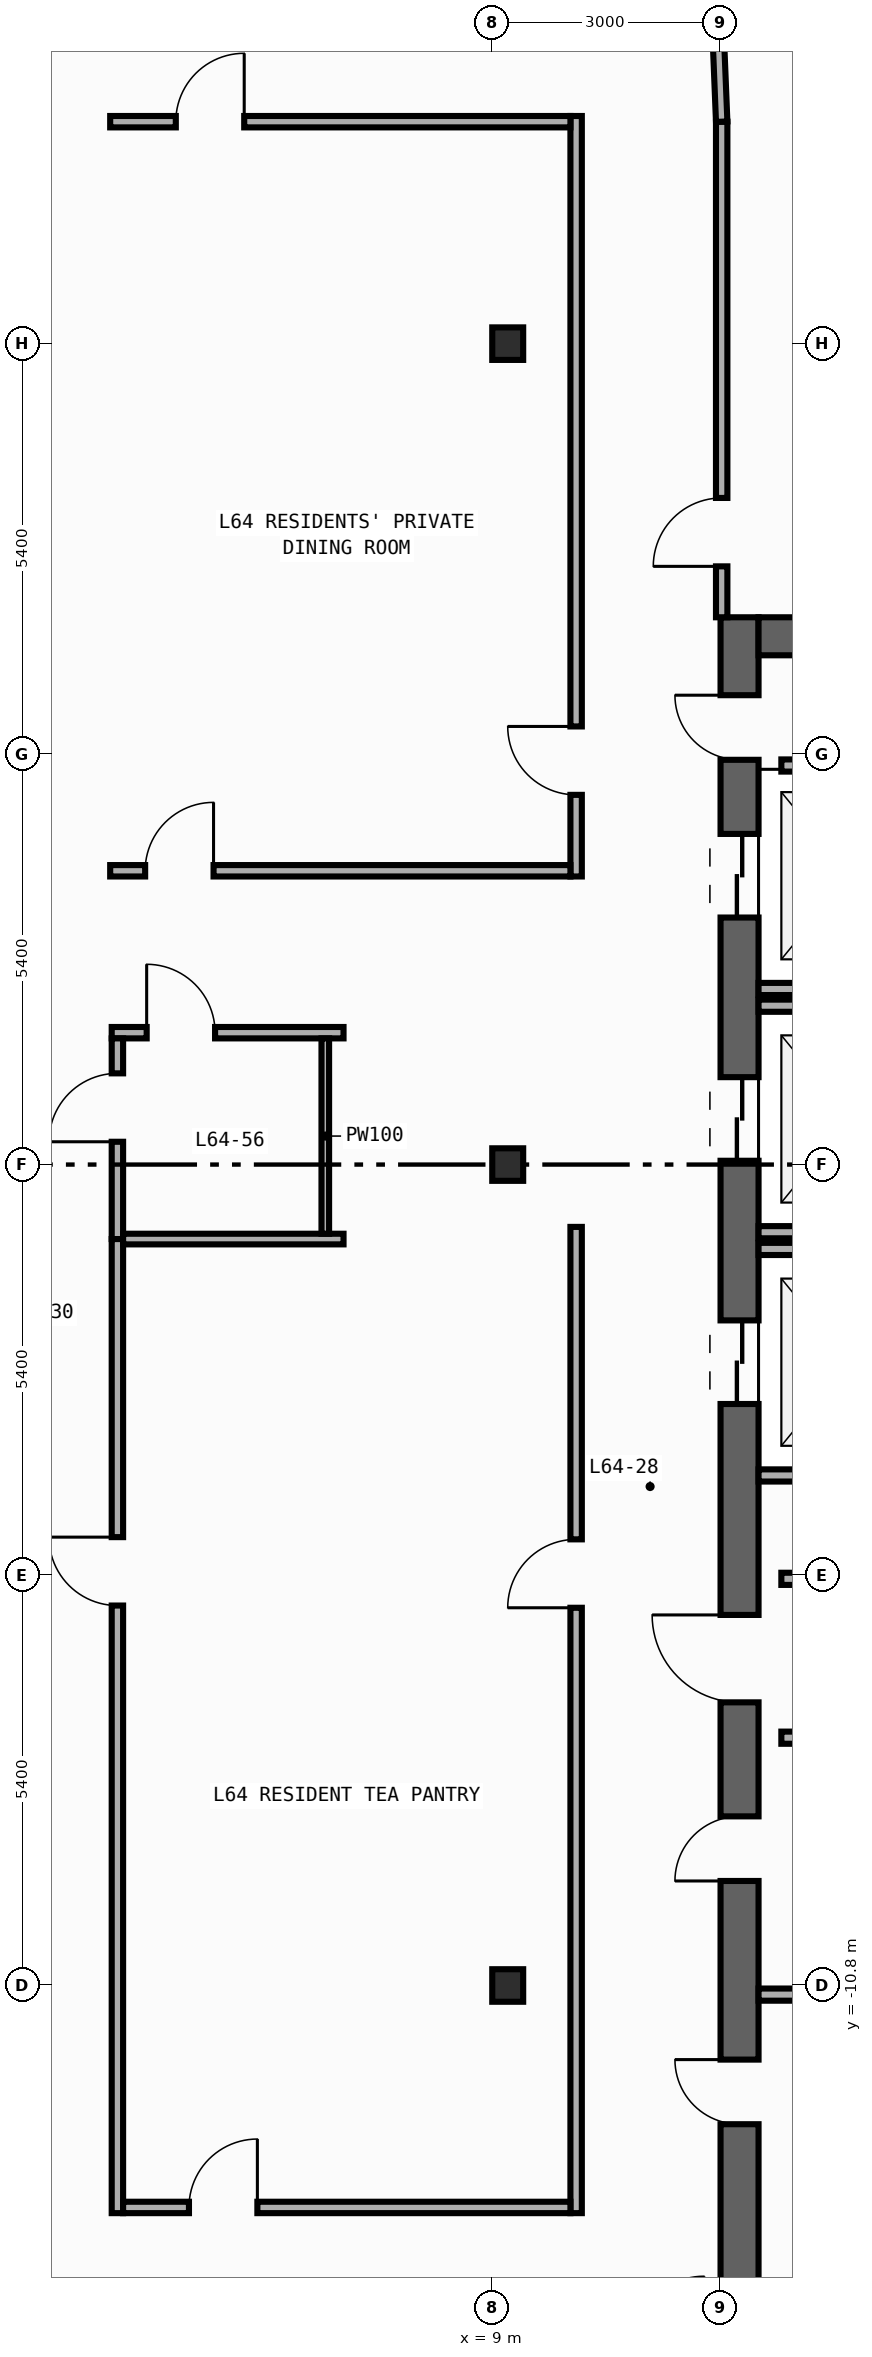
"""IFC4 building model, lengths in metres.
Left out: names, types, materials, properties, quantities, classifications, styles, units other than length and angle.
Written with IfcOpenShell. Run it as: python <this file> out.ifc"""

import sys

from ifc_helpers import new_model, si_unit, direction, frame, frame_2d, origin, origin_2d, place, context, subcontext, project, spatial, rectangle, i_section, extrude, element, fill, save


model = new_model("IFC4")
c1 = context("Model", 3, precision=1e-05, world=origin(), true_north=direction((0.0, 1.0)))
c2 = subcontext(c1, "Body", "Model", "MODEL_VIEW")
j1 = project(units=[si_unit("LENGTHUNIT", "METRE"), si_unit("PLANEANGLEUNIT", "RADIAN")], contexts=[c1])
p1 = place(None, origin())
s1 = spatial("IfcSite", under=j1, at=p1, CompositionType="ELEMENT")
p2 = place(p1, origin())
s2 = spatial("IfcBuilding", under=s1, at=p2, CompositionType="ELEMENT")
p3 = place(p2, frame((0.0, 0.0, 269.2)))
s3 = spatial("IfcBuildingStorey", under=s2, at=p3, CompositionType="ELEMENT", Elevation=269.2)
p4 = place(p3, frame((12.25, -19.8, 0.0), z_axis=(0.0, 0.0, 1.0), x_axis=(0.0, 1.0, 0.0)))
e1 = element("IfcWall", 1, at=p4, inside=s3, PredefinedType="SHEAR", context=c2, shape_type="SweptSolid", body=[
    extrude(rectangle(XDim=27.0, YDim=0.5, at=frame_2d((13.5, 0.0))), origin(), (0.0, 0.0, 1.0), 3.25),
])
p5 = place(p4, frame((23.05, 0.0, 0.0)))
e2 = element("IfcOpeningElement", 2, at=p5, cuts=e1, PredefinedType="OPENING", context=c2, shape_type="SweptSolid", body=[
    extrude(rectangle(XDim=1.1, YDim=2.2, at=frame_2d((0.55, 1.1))), frame((0.0, 0.26, 0.0), z_axis=(0.0, -1.0, 0.0), x_axis=(1.0, 0.0, 0.0)), (0.0, 0.0, 1.0), 0.52),
])
p6 = place(p4, frame((19.85, 0.0, 0.0)))
e3 = element("IfcOpeningElement", 3, at=p6, cuts=e1, PredefinedType="OPENING", context=c2, shape_type="SweptSolid", body=[
    extrude(rectangle(XDim=1.1, YDim=2.2, at=frame_2d((0.55, 1.1))), frame((0.0, 0.26, 0.0), z_axis=(0.0, -1.0, 0.0), x_axis=(1.0, 0.0, 0.0)), (0.0, 0.0, 1.0), 0.52),
])
p7 = place(p4, frame((16.65, 0.0, 0.0)))
e4 = element("IfcOpeningElement", 4, at=p7, cuts=e1, PredefinedType="OPENING", context=c2, shape_type="SweptSolid", body=[
    extrude(rectangle(XDim=1.1, YDim=2.2, at=frame_2d((0.55, 1.1))), frame((0.0, 0.26, 0.0), z_axis=(0.0, -1.0, 0.0), x_axis=(1.0, 0.0, 0.0)), (0.0, 0.0, 1.0), 0.52),
])
p8 = place(p4, frame((7.175, 0.0, 0.0)))
e5 = element("IfcOpeningElement", 5, at=p8, cuts=e1, PredefinedType="OPENING", context=c2, shape_type="SweptSolid", body=[
    extrude(rectangle(XDim=0.85, YDim=2.1, at=frame_2d((0.425, 1.05))), frame((0.0, 0.26, 0.0), z_axis=(0.0, -1.0, 0.0), x_axis=(1.0, 0.0, 0.0)), (0.0, 0.0, 1.0), 0.52),
])
p9 = place(p4, frame((10.375, 0.0, 0.0)))
e6 = element("IfcOpeningElement", 6, at=p9, cuts=e1, PredefinedType="OPENING", context=c2, shape_type="SweptSolid", body=[
    extrude(rectangle(XDim=0.85, YDim=2.1, at=frame_2d((0.425, 1.05))), frame((0.0, 0.26, 0.0), z_axis=(0.0, -1.0, 0.0), x_axis=(1.0, 0.0, 0.0)), (0.0, 0.0, 1.0), 0.52),
])
p10 = place(p4, frame((12.725, 0.0, 0.0)))
e7 = element("IfcOpeningElement", 7, at=p10, cuts=e1, PredefinedType="OPENING", context=c2, shape_type="SweptSolid", body=[
    extrude(rectangle(XDim=1.15, YDim=2.2, at=frame_2d((0.575, 1.1))), frame((0.0, 0.26, 0.0), z_axis=(0.0, -1.0, 0.0), x_axis=(1.0, 0.0, 0.0)), (0.0, 0.0, 1.0), 0.52),
])
p11 = place(p4, frame((25.125, 0.0, 0.0)))
e8 = element("IfcOpeningElement", 8, at=p11, cuts=e1, PredefinedType="OPENING", context=c2, shape_type="SweptSolid", body=[
    extrude(rectangle(XDim=0.85, YDim=2.1, at=frame_2d((0.425, 1.05))), frame((0.0, 0.26, 0.0), z_axis=(0.0, -1.0, 0.0), x_axis=(1.0, 0.0, 0.0)), (0.0, 0.0, 1.0), 0.52),
])
p12 = place(p3, frame((12.5, 6.95, 0.0), z_axis=(0.0, 0.0, 1.0), x_axis=(1.0, 0.0, 0.0)))
e9 = element("IfcWall", 9, at=p12, inside=s3, PredefinedType="SHEAR", context=c2, shape_type="SweptSolid", body=[
    extrude(rectangle(XDim=7.4, YDim=0.5, at=frame_2d((3.7, 0.0))), origin(), (0.0, 0.0, 1.0), 3.25),
])
for number, where, z_axis, x_axis in (
    (10, (9.2, -10.8, 0.0), (0.0, 0.0, 1.0), (1.0, 0.0, 0.0)),
    (11, (9.2, 0.0, 0.0), (0.0, 0.0, 1.0), (1.0, 0.0, 0.0)),
    (12, (9.2, 10.8, 0.0), (0.0, 0.0, 1.0), (1.0, 0.0, 0.0)),
):
    element("IfcColumn", number, at=place(p3, frame(where, z_axis=z_axis, x_axis=x_axis)), inside=s3, PredefinedType="COLUMN", context=c2, shape_type="SweptSolid", body=[
        extrude(i_section(OverallWidth=0.407, OverallDepth=0.428, WebThickness=0.02, FlangeThickness=0.035, FilletRadius=0.022, at=origin_2d()), origin(), (0.0, 0.0, 1.0), 3.6),
    ])
for number, where, z_axis, x_axis in (
    (13, (12.5, 2.31, 0.0), (0.0, 0.0, 1.0), (1.0, 0.0, 0.0)),
    (14, (12.5, -0.89, 0.0), (0.0, 0.0, 1.0), (1.0, 0.0, 0.0)),
    (15, (12.5, 2.09, 0.0), (0.0, 0.0, 1.0), (1.0, 0.0, 0.0)),
    (16, (12.5, -4.09, 0.0), (0.0, 0.0, 1.0), (1.0, 0.0, 0.0)),
    (17, (12.5, -1.11, 0.0), (0.0, 0.0, 1.0), (1.0, 0.0, 0.0)),
):
    element("IfcWall", number, at=place(p3, frame(where, z_axis=z_axis, x_axis=x_axis)), inside=s3, PredefinedType="STANDARD", context=c2, shape_type="SweptSolid", body=[
        extrude(rectangle(XDim=2.49, YDim=0.16, at=frame_2d((1.245, 0.0))), origin(), (0.0, 0.0, 1.0), 3.25),
    ])
for number, where, z_axis, x_axis in (
    (18, (12.8, -5.45, 0.0), (0.0, 0.0, 1.0), (1.0, 0.0, 0.0)),
    (19, (12.8, -7.54, 0.0), (0.0, 0.0, 1.0), (1.0, 0.0, 0.0)),
    (20, (12.8, 5.25, 0.0), (0.0, 0.0, 1.0), (1.0, 0.0, 0.0)),
):
    element("IfcWall", number, at=place(p3, frame(where, z_axis=z_axis, x_axis=x_axis)), inside=s3, PredefinedType="STANDARD", context=c2, shape_type="SweptSolid", body=[
        extrude(rectangle(XDim=2.6, YDim=0.16, at=frame_2d((1.3, 0.0))), origin(), (0.0, 0.0, 1.0), 3.25),
    ])
p13 = place(p3, frame((12.5, -10.92, 0.0), z_axis=(0.0, 0.0, 1.0), x_axis=(1.0, 0.0, 0.0)))
e21 = element("IfcWall", 21, at=p13, inside=s3, PredefinedType="PARTITIONING", context=c2, shape_type="SweptSolid", body=[
    extrude(rectangle(XDim=2.9, YDim=0.16, at=frame_2d((1.45, 0.0))), origin(), (0.0, 0.0, 1.0), 2.35),
])
p14 = place(p3, frame((12.015, 7.2, 0.0), z_axis=(0.0, 0.0, 1.0), x_axis=(0.0, 1.0, 0.0)))
e22 = element("IfcWall", 22, at=p14, inside=s3, PredefinedType="PARTITIONING", context=c2, shape_type="SweptSolid", body=[
    extrude(rectangle(XDim=6.52, YDim=0.15, at=frame_2d((3.26, 0.0))), origin(), (0.0, 0.0, 1.0), 3.25),
])
p15 = place(p14, frame((0.67, 0.0, 0.0)))
e23 = element("IfcOpeningElement", 23, at=p15, cuts=e22, PredefinedType="OPENING", context=c2, shape_type="SweptSolid", body=[
    extrude(rectangle(XDim=0.9, YDim=2.15, at=frame_2d((0.45, 1.075))), frame((0.0, 0.085, 0.0), z_axis=(0.0, -1.0, 0.0), x_axis=(1.0, 0.0, 0.0)), (0.0, 0.0, 1.0), 0.17),
])
p16 = place(p3, frame((10.1, 3.79, 0.0), z_axis=(0.0, 0.0, 1.0), x_axis=(0.0, 1.0, 0.0)))
e24 = element("IfcWall", 24, at=p16, inside=s3, PredefinedType="PARTITIONING", context=c2, shape_type="SweptSolid", body=[
    extrude(rectangle(XDim=10.005, YDim=0.15, at=frame_2d((5.002, 0.0))), origin(), (0.0, 0.0, 1.0), 3.25),
])
p17 = place(p16, frame((1.074, 0.0, 0.0)))
e25 = element("IfcOpeningElement", 25, at=p17, cuts=e24, PredefinedType="OPENING", context=c2, shape_type="SweptSolid", body=[
    extrude(rectangle(XDim=0.9, YDim=2.15, at=frame_2d((0.45, 1.075))), frame((0.0, 0.085, 0.0), z_axis=(0.0, -1.0, 0.0), x_axis=(1.0, 0.0, 0.0)), (0.0, 0.0, 1.0), 0.17),
])
p18 = place(p3, frame((10.1, -13.795, 0.0), z_axis=(0.0, 0.0, 1.0), x_axis=(0.0, 1.0, 0.0)))
e26 = element("IfcWall", 26, at=p18, inside=s3, PredefinedType="PARTITIONING", context=c2, shape_type="SweptSolid", body=[
    extrude(rectangle(XDim=12.975, YDim=0.15, at=frame_2d((6.487, 0.0))), origin(), (0.0, 0.0, 1.0), 3.25),
])
p19 = place(p18, frame((7.964, 0.0, 0.0)))
e27 = element("IfcOpeningElement", 27, at=p19, cuts=e26, PredefinedType="OPENING", context=c2, shape_type="SweptSolid", body=[
    extrude(rectangle(XDim=0.9, YDim=2.15, at=frame_2d((0.45, 1.075))), frame((0.0, 0.085, 0.0), z_axis=(0.0, -1.0, 0.0), x_axis=(1.0, 0.0, 0.0)), (0.0, 0.0, 1.0), 0.17),
])
p20 = place(p3, frame((3.97, 3.865, 0.0), z_axis=(0.0, 0.0, 1.0), x_axis=(1.0, 0.0, 0.0)))
e28 = element("IfcWall", 28, at=p20, inside=s3, PredefinedType="PARTITIONING", context=c2, shape_type="SweptSolid", body=[
    extrude(rectangle(XDim=6.055, YDim=0.15, at=frame_2d((3.027, 0.0))), origin(), (0.0, 0.0, 1.0), 3.25),
])
p21 = place(p20, frame((0.46, 0.0, 0.0)))
e29 = element("IfcOpeningElement", 29, at=p21, cuts=e28, PredefinedType="OPENING", context=c2, shape_type="SweptSolid", body=[
    extrude(rectangle(XDim=0.9, YDim=2.15, at=frame_2d((0.45, 1.075))), frame((0.0, 0.085, 0.0), z_axis=(0.0, -1.0, 0.0), x_axis=(1.0, 0.0, 0.0)), (0.0, 0.0, 1.0), 0.17),
])
p22 = place(p3, frame((3.99, 1.735, 0.0), z_axis=(0.0, 0.0, 1.0), x_axis=(1.0, 0.0, 0.0)))
e30 = element("IfcWall", 30, at=p22, inside=s3, PredefinedType="PARTITIONING", context=c2, shape_type="SweptSolid", body=[
    extrude(rectangle(XDim=3.05, YDim=0.15, at=frame_2d((1.525, 0.0))), origin(), (0.0, 0.0, 1.0), 3.25),
])
p23 = place(p22, frame((0.46, 0.0, 0.0)))
e31 = element("IfcOpeningElement", 31, at=p23, cuts=e30, PredefinedType="OPENING", context=c2, shape_type="SweptSolid", body=[
    extrude(rectangle(XDim=0.9, YDim=2.15, at=frame_2d((0.45, 1.075))), frame((0.0, 0.085, 0.0), z_axis=(0.0, -1.0, 0.0), x_axis=(1.0, 0.0, 0.0)), (0.0, 0.0, 1.0), 0.17),
])
p24 = place(p3, frame((4.065, -0.98, 0.0), z_axis=(0.0, 0.0, 1.0), x_axis=(0.0, 1.0, 0.0)))
e32 = element("IfcWall", 32, at=p24, inside=s3, PredefinedType="PARTITIONING", context=c2, shape_type="SweptSolid", body=[
    extrude(rectangle(XDim=2.64, YDim=0.15, at=frame_2d((1.32, 0.0))), origin(), (0.0, 0.0, 1.0), 3.25),
])
p25 = place(p24, frame((1.28, 0.0, 0.0)))
e33 = element("IfcOpeningElement", 33, at=p25, cuts=e32, PredefinedType="OPENING", context=c2, shape_type="SweptSolid", body=[
    extrude(rectangle(XDim=0.9, YDim=2.15, at=frame_2d((0.45, 1.075))), frame((0.0, 0.085, 0.0), z_axis=(0.0, -1.0, 0.0), x_axis=(1.0, 0.0, 0.0)), (0.0, 0.0, 1.0), 0.17),
])
p26 = place(p3, frame((4.065, -13.795, 0.0), z_axis=(0.0, 0.0, 1.0), x_axis=(0.0, 1.0, 0.0)))
e34 = element("IfcWall", 34, at=p26, inside=s3, PredefinedType="PARTITIONING", context=c2, shape_type="SweptSolid", body=[
    extrude(rectangle(XDim=12.815, YDim=0.15, at=frame_2d((6.407, 0.0))), origin(), (0.0, 0.0, 1.0), 3.25),
])
p27 = place(p26, frame((7.994, 0.0, 0.0)))
e35 = element("IfcOpeningElement", 35, at=p27, cuts=e34, PredefinedType="OPENING", context=c2, shape_type="SweptSolid", body=[
    extrude(rectangle(XDim=0.9, YDim=2.15, at=frame_2d((0.45, 1.075))), frame((0.0, 0.085, 0.0), z_axis=(0.0, -1.0, 0.0), x_axis=(1.0, 0.0, 0.0)), (0.0, 0.0, 1.0), 0.17),
])
p28 = place(p3, frame((12.015, 13.72, 0.0), z_axis=(0.0, 0.0, 1.0), x_axis=(-0.040046877756, 0.99919780203, 0.0)))
e36 = element("IfcWall", 36, at=p28, inside=s3, PredefinedType="PARTITIONING", context=c2, shape_type="SweptSolid", body=[
    extrude(rectangle(XDim=1.731, YDim=0.15, at=frame_2d((0.866, 0.0))), origin(), (0.0, 0.0, 1.0), 3.25),
])
p29 = place(p3, frame((3.97, 13.72, 0.0), z_axis=(0.0, 0.0, 1.0), x_axis=(1.0, 0.0, 0.0)))
e37 = element("IfcWall", 37, at=p29, inside=s3, PredefinedType="PARTITIONING", context=c2, shape_type="SweptSolid", body=[
    extrude(rectangle(XDim=6.055, YDim=0.15, at=frame_2d((3.027, 0.0))), origin(), (0.0, 0.0, 1.0), 3.25),
])
p30 = place(p29, frame((0.863, 0.0, 0.0)))
e38 = element("IfcOpeningElement", 38, at=p30, cuts=e37, PredefinedType="OPENING", context=c2, shape_type="SweptSolid", body=[
    extrude(rectangle(XDim=0.9, YDim=2.15, at=frame_2d((0.45, 1.075))), frame((0.0, 0.085, 0.0), z_axis=(0.0, -1.0, 0.0), x_axis=(1.0, 0.0, 0.0)), (0.0, 0.0, 1.0), 0.17),
])
p31 = place(p3, frame((4.14, -13.72, 0.0), z_axis=(0.0, 0.0, 1.0), x_axis=(1.0, 0.0, 0.0)))
e39 = element("IfcWall", 39, at=p31, inside=s3, PredefinedType="PARTITIONING", context=c2, shape_type="SweptSolid", body=[
    extrude(rectangle(XDim=5.885, YDim=0.15, at=frame_2d((2.942, 0.0))), origin(), (0.0, 0.0, 1.0), 3.25),
])
p32 = place(p31, frame((0.866, 0.0, 0.0)))
e40 = element("IfcOpeningElement", 40, at=p32, cuts=e39, PredefinedType="OPENING", context=c2, shape_type="SweptSolid", body=[
    extrude(rectangle(XDim=0.9, YDim=2.15, at=frame_2d((0.45, 1.075))), frame((0.0, 0.085, 0.0), z_axis=(0.0, -1.0, 0.0), x_axis=(1.0, 0.0, 0.0)), (0.0, 0.0, 1.0), 0.17),
])
p33 = place(p3, frame((4.14, -0.98, 0.0), z_axis=(0.0, 0.0, 1.0), x_axis=(1.0, 0.0, 0.0)))
e41 = element("IfcWall", 41, at=p33, inside=s3, PredefinedType="PARTITIONING", context=c2, shape_type="SweptSolid", body=[
    extrude(rectangle(XDim=2.9, YDim=0.14, at=frame_2d((1.45, 0.0))), origin(), (0.0, 0.0, 1.0), 3.25),
])
p34 = place(p3, frame((6.8, 1.66, 0.0), z_axis=(0.0, 0.0, 1.0), x_axis=(0.0, -1.0, 0.0)))
e42 = element("IfcWall", 42, at=p34, inside=s3, PredefinedType="PARTITIONING", context=c2, shape_type="SweptSolid", body=[
    extrude(rectangle(XDim=2.57, YDim=0.1, at=frame_2d((1.285, 0.0))), origin(), (0.0, 0.0, 1.0), 3.25),
])
p35 = place(p5, origin())
e43 = element("IfcDoor", 43, at=p35, inside=s3, OperationType="DOUBLE_DOOR_SLIDING", PredefinedType="DOOR", context=c2, shape_type="SweptSolid", body=[
    extrude(rectangle(XDim=1.1, YDim=2.2, at=frame_2d((0.55, 1.1))), frame((0.0, 0.025, 0.0), z_axis=(0.0, -1.0, 0.0), x_axis=(1.0, 0.0, 0.0)), (0.0, 0.0, 1.0), 0.05),
])
fill(e2, e43)
p36 = place(p6, origin())
e44 = element("IfcDoor", 44, at=p36, inside=s3, OperationType="DOUBLE_DOOR_SLIDING", PredefinedType="DOOR", context=c2, shape_type="SweptSolid", body=[
    extrude(rectangle(XDim=1.1, YDim=2.2, at=frame_2d((0.55, 1.1))), frame((0.0, 0.025, 0.0), z_axis=(0.0, -1.0, 0.0), x_axis=(1.0, 0.0, 0.0)), (0.0, 0.0, 1.0), 0.05),
])
fill(e3, e44)
p37 = place(p7, origin())
e45 = element("IfcDoor", 45, at=p37, inside=s3, OperationType="DOUBLE_DOOR_SLIDING", PredefinedType="DOOR", context=c2, shape_type="SweptSolid", body=[
    extrude(rectangle(XDim=1.1, YDim=2.2, at=frame_2d((0.55, 1.1))), frame((0.0, 0.025, 0.0), z_axis=(0.0, -1.0, 0.0), x_axis=(1.0, 0.0, 0.0)), (0.0, 0.0, 1.0), 0.05),
])
fill(e4, e45)
p38 = place(p8, origin())
e46 = element("IfcDoor", 46, at=p38, inside=s3, OperationType="SINGLE_SWING_RIGHT", PredefinedType="DOOR", context=c2, shape_type="SweptSolid", body=[
    extrude(rectangle(XDim=0.85, YDim=2.1, at=frame_2d((0.425, 1.05))), frame((0.0, 0.025, 0.0), z_axis=(0.0, -1.0, 0.0), x_axis=(1.0, 0.0, 0.0)), (0.0, 0.0, 1.0), 0.05),
])
fill(e5, e46)
p39 = place(p9, origin())
e47 = element("IfcDoor", 47, at=p39, inside=s3, OperationType="SINGLE_SWING_LEFT", PredefinedType="DOOR", context=c2, shape_type="SweptSolid", body=[
    extrude(rectangle(XDim=0.85, YDim=2.1, at=frame_2d((0.425, 1.05))), frame((0.0, 0.025, 0.0), z_axis=(0.0, -1.0, 0.0), x_axis=(1.0, 0.0, 0.0)), (0.0, 0.0, 1.0), 0.05),
])
fill(e6, e47)
p40 = place(p10, origin())
e48 = element("IfcDoor", 48, at=p40, inside=s3, OperationType="SINGLE_SWING_RIGHT", PredefinedType="DOOR", context=c2, shape_type="SweptSolid", body=[
    extrude(rectangle(XDim=1.15, YDim=2.2, at=frame_2d((0.575, 1.1))), frame((0.0, 0.025, 0.0), z_axis=(0.0, -1.0, 0.0), x_axis=(1.0, 0.0, 0.0)), (0.0, 0.0, 1.0), 0.05),
])
fill(e7, e48)
p41 = place(p11, origin())
e49 = element("IfcDoor", 49, at=p41, inside=s3, OperationType="SINGLE_SWING_RIGHT", PredefinedType="DOOR", context=c2, shape_type="SweptSolid", body=[
    extrude(rectangle(XDim=0.85, YDim=2.1, at=frame_2d((0.425, 1.05))), frame((0.0, 0.025, 0.0), z_axis=(0.0, -1.0, 0.0), x_axis=(1.0, 0.0, 0.0)), (0.0, 0.0, 1.0), 0.05),
])
fill(e8, e49)
p42 = place(p15, origin())
e50 = element("IfcDoor", 50, at=p42, inside=s3, OperationType="SINGLE_SWING_LEFT", PredefinedType="DOOR", context=c2, shape_type="SweptSolid", body=[
    extrude(rectangle(XDim=0.9, YDim=2.15, at=frame_2d((0.45, 1.075))), frame((0.0, 0.025, 0.0), z_axis=(0.0, -1.0, 0.0), x_axis=(1.0, 0.0, 0.0)), (0.0, 0.0, 1.0), 0.05),
])
fill(e23, e50)
p43 = place(p17, origin())
e51 = element("IfcDoor", 51, at=p43, inside=s3, OperationType="SINGLE_SWING_RIGHT", PredefinedType="DOOR", context=c2, shape_type="SweptSolid", body=[
    extrude(rectangle(XDim=0.9, YDim=2.15, at=frame_2d((0.45, 1.075))), frame((0.0, 0.025, 0.0), z_axis=(0.0, -1.0, 0.0), x_axis=(1.0, 0.0, 0.0)), (0.0, 0.0, 1.0), 0.05),
])
fill(e25, e51)
p44 = place(p19, origin())
e52 = element("IfcDoor", 52, at=p44, inside=s3, OperationType="SINGLE_SWING_LEFT", PredefinedType="DOOR", context=c2, shape_type="SweptSolid", body=[
    extrude(rectangle(XDim=0.9, YDim=2.15, at=frame_2d((0.45, 1.075))), frame((0.0, 0.025, 0.0), z_axis=(0.0, -1.0, 0.0), x_axis=(1.0, 0.0, 0.0)), (0.0, 0.0, 1.0), 0.05),
])
fill(e27, e52)
p45 = place(p21, origin())
e53 = element("IfcDoor", 53, at=p45, inside=s3, OperationType="SINGLE_SWING_RIGHT", PredefinedType="DOOR", context=c2, shape_type="SweptSolid", body=[
    extrude(rectangle(XDim=0.9, YDim=2.15, at=frame_2d((0.45, 1.075))), frame((0.0, 0.025, 0.0), z_axis=(0.0, -1.0, 0.0), x_axis=(1.0, 0.0, 0.0)), (0.0, 0.0, 1.0), 0.05),
])
fill(e29, e53)
p46 = place(p23, origin())
e54 = element("IfcDoor", 54, at=p46, inside=s3, OperationType="SINGLE_SWING_LEFT", PredefinedType="DOOR", context=c2, shape_type="SweptSolid", body=[
    extrude(rectangle(XDim=0.9, YDim=2.15, at=frame_2d((0.45, 1.075))), frame((0.0, 0.025, 0.0), z_axis=(0.0, -1.0, 0.0), x_axis=(1.0, 0.0, 0.0)), (0.0, 0.0, 1.0), 0.05),
])
fill(e31, e54)
p47 = place(p25, origin())
e55 = element("IfcDoor", 55, at=p47, inside=s3, OperationType="SINGLE_SWING_LEFT", PredefinedType="DOOR", context=c2, shape_type="SweptSolid", body=[
    extrude(rectangle(XDim=0.9, YDim=2.15, at=frame_2d((0.45, 1.075))), frame((0.0, 0.025, 0.0), z_axis=(0.0, -1.0, 0.0), x_axis=(1.0, 0.0, 0.0)), (0.0, 0.0, 1.0), 0.05),
])
fill(e33, e55)
p48 = place(p27, origin())
e56 = element("IfcDoor", 56, at=p48, inside=s3, OperationType="SINGLE_SWING_RIGHT", PredefinedType="DOOR", context=c2, shape_type="SweptSolid", body=[
    extrude(rectangle(XDim=0.9, YDim=2.15, at=frame_2d((0.45, 1.075))), frame((0.0, 0.025, 0.0), z_axis=(0.0, -1.0, 0.0), x_axis=(1.0, 0.0, 0.0)), (0.0, 0.0, 1.0), 0.05),
])
fill(e35, e56)
p49 = place(p30, origin())
e57 = element("IfcDoor", 57, at=p49, inside=s3, OperationType="SINGLE_SWING_RIGHT", PredefinedType="DOOR", context=c2, shape_type="SweptSolid", body=[
    extrude(rectangle(XDim=0.9, YDim=2.15, at=frame_2d((0.45, 1.075))), frame((0.0, 0.025, 0.0), z_axis=(0.0, -1.0, 0.0), x_axis=(1.0, 0.0, 0.0)), (0.0, 0.0, 1.0), 0.05),
])
fill(e38, e57)
p50 = place(p32, origin())
e58 = element("IfcDoor", 58, at=p50, inside=s3, OperationType="SINGLE_SWING_RIGHT", PredefinedType="DOOR", context=c2, shape_type="SweptSolid", body=[
    extrude(rectangle(XDim=0.9, YDim=2.15, at=frame_2d((0.45, 1.075))), frame((0.0, 0.025, 0.0), z_axis=(0.0, -1.0, 0.0), x_axis=(1.0, 0.0, 0.0)), (0.0, 0.0, 1.0), 0.05),
])
fill(e40, e58)
save(model, sys.argv[1])
